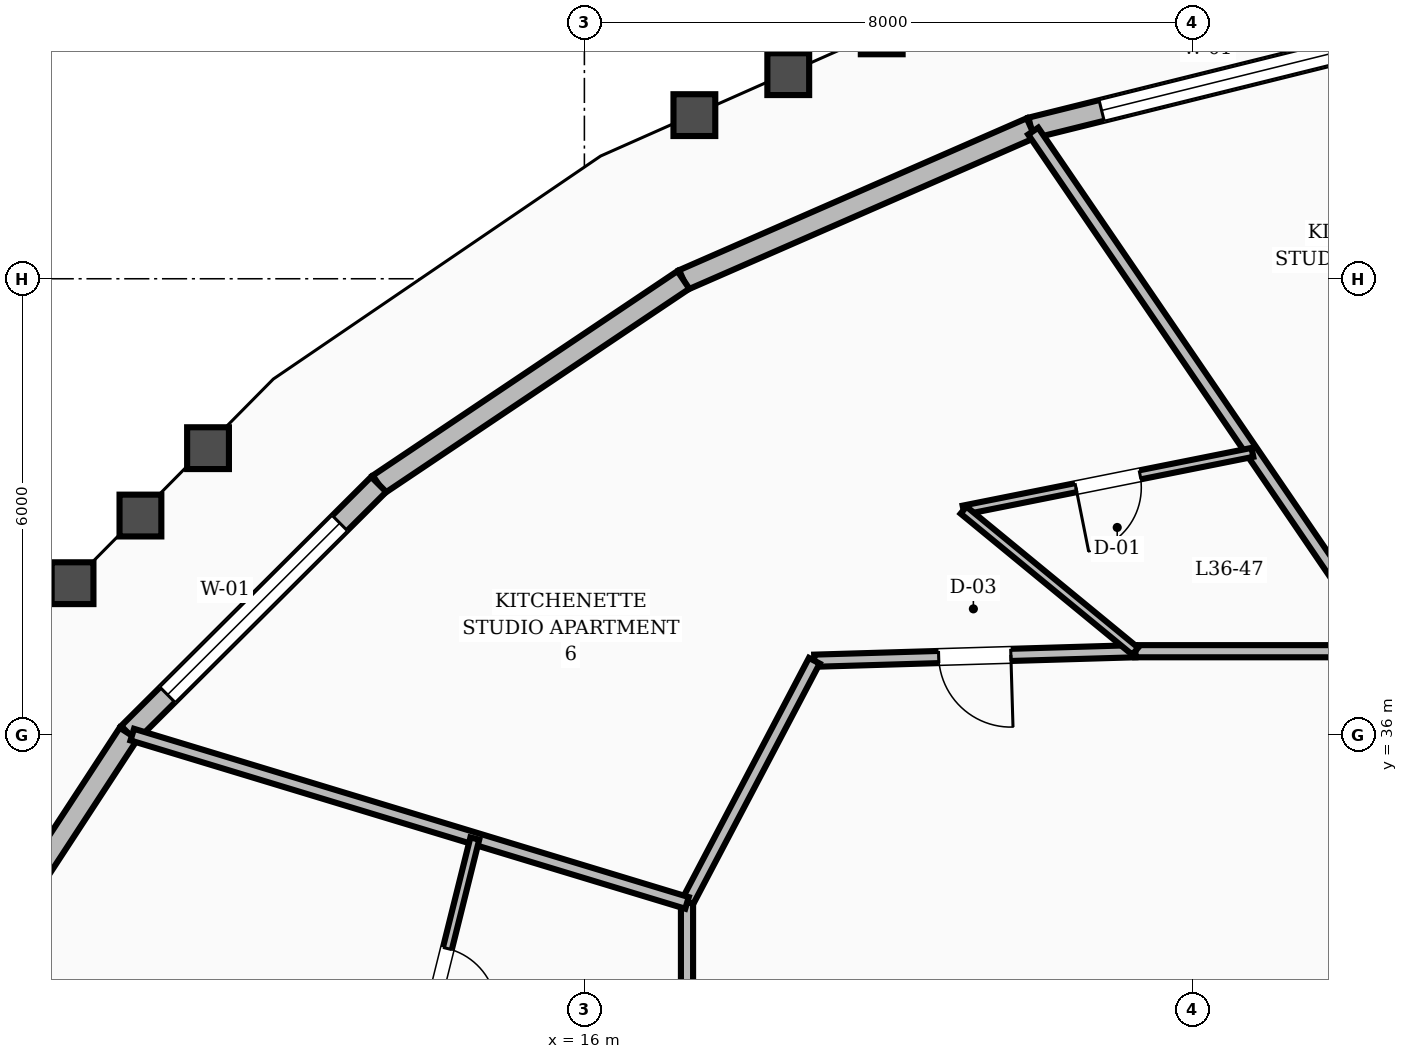
"""IFC4 building model, lengths in metres.
Left out: names, types, materials, properties, quantities, classifications, styles, units other than length and angle.
Written with IfcOpenShell. Run it as: python <this file> out.ifc"""

import sys

from ifc_helpers import new_model, si_unit, direction, frame, frame_2d, origin, place, context, subcontext, project, spatial, rectangle, extrude, element, fill, save


model = new_model("IFC4")
c1 = context("Model", 3, precision=1e-05, world=origin(), true_north=direction((0.0, 1.0)))
c2 = subcontext(c1, "Body", "Model", "MODEL_VIEW")
j1 = project(units=[si_unit("LENGTHUNIT", "METRE"), si_unit("PLANEANGLEUNIT", "RADIAN")], contexts=[c1])
p1 = place(None, origin())
s1 = spatial("IfcSite", under=j1, at=p1, CompositionType="ELEMENT")
p2 = place(p1, origin())
s2 = spatial("IfcBuilding", under=s1, at=p2, CompositionType="ELEMENT")
p3 = place(p2, frame((0.0, 0.0, 142.4)))
s3 = spatial("IfcBuildingStorey", under=s2, at=p3, CompositionType="ELEMENT", Elevation=142.4)
p4 = place(p3, frame((26.839, 45.215, 0.0), z_axis=(0.0, 0.0, 1.0), x_axis=(-0.970601368837, -0.240692714498, 0.0)))
e1 = element("IfcWall", 1, at=p4, inside=s3, PredefinedType="STANDARD", context=c2, shape_type="SweptSolid", body=[
    extrude(rectangle(XDim=5.113, YDim=0.28, at=frame_2d((2.557, 0.0))), origin(), (0.0, 0.0, 1.0), 2.82),
])
p5 = place(p4, frame((0.957, 0.0, 0.8)))
e2 = element("IfcOpeningElement", 2, at=p5, cuts=e1, PredefinedType="OPENING", context=c2, shape_type="SweptSolid", body=[
    extrude(rectangle(XDim=3.2, YDim=1.65, at=frame_2d((1.6, 0.825))), frame((0.0, 0.15, 0.0), z_axis=(0.0, -1.0, 0.0), x_axis=(1.0, 0.0, 0.0)), (0.0, 0.0, 1.0), 0.3),
])
p6 = place(p3, frame((21.876, 43.984, 0.0), z_axis=(0.0, 0.0, 1.0), x_axis=(-0.916303206083, -0.400485248821, 0.0)))
e3 = element("IfcWall", 3, at=p6, inside=s3, PredefinedType="STANDARD", context=c2, shape_type="SweptSolid", body=[
    extrude(rectangle(XDim=4.991, YDim=0.28, at=frame_2d((2.496, 0.0))), origin(), (0.0, 0.0, 1.0), 2.82),
])
p7 = place(p3, frame((17.302, 41.985, 0.0), z_axis=(0.0, 0.0, 1.0), x_axis=(-0.830381581739, -0.55719514419, 0.0)))
e4 = element("IfcWall", 4, at=p7, inside=s3, PredefinedType="STANDARD", context=c2, shape_type="SweptSolid", body=[
    extrude(rectangle(XDim=4.828, YDim=0.28, at=frame_2d((2.414, 0.0))), origin(), (0.0, 0.0, 1.0), 2.82),
])
p8 = place(p3, frame((13.294, 39.295, 0.0), z_axis=(0.0, 0.0, 1.0), x_axis=(-0.708393596514, -0.705817619799, 0.0)))
e5 = element("IfcWall", 5, at=p8, inside=s3, PredefinedType="STANDARD", context=c2, shape_type="SweptSolid", body=[
    extrude(rectangle(XDim=4.644, YDim=0.28, at=frame_2d((2.322, 0.0))), origin(), (0.0, 0.0, 1.0), 2.82),
])
p9 = place(p8, frame((0.722, 0.0, 0.8)))
e6 = element("IfcOpeningElement", 6, at=p9, cuts=e5, PredefinedType="OPENING", context=c2, shape_type="SweptSolid", body=[
    extrude(rectangle(XDim=3.2, YDim=1.65, at=frame_2d((1.6, 0.825))), frame((0.0, 0.15, 0.0), z_axis=(0.0, -1.0, 0.0), x_axis=(1.0, 0.0, 0.0)), (0.0, 0.0, 1.0), 0.3),
])
p10 = place(p3, frame((10.004, 36.017, 0.0), z_axis=(0.0, 0.0, 1.0), x_axis=(-0.547212555107, -0.836993679506, 0.0)))
e7 = element("IfcWall", 7, at=p10, inside=s3, PredefinedType="STANDARD", context=c2, shape_type="SweptSolid", body=[
    extrude(rectangle(XDim=4.468, YDim=0.28, at=frame_2d((2.234, 0.0))), origin(), (0.0, 0.0, 1.0), 2.82),
])
p11 = place(p3, frame((26.574, 37.1, 0.0), z_axis=(0.0, 0.0, 1.0), x_axis=(-1.0, 0.0, 0.0)))
e8 = element("IfcWall", 8, at=p11, inside=s3, PredefinedType="SOLIDWALL", context=c2, shape_type="SweptSolid", body=[
    extrude(rectangle(XDim=3.327, YDim=0.16, at=frame_2d((1.664, 0.0))), origin(), (0.0, 0.0, 1.0), 2.8),
])
p12 = place(p3, frame((23.247, 37.1, 0.0), z_axis=(0.0, 0.0, 1.0), x_axis=(-0.999561990195, -0.029594387265, 0.0)))
e9 = element("IfcWall", 9, at=p12, inside=s3, PredefinedType="SOLIDWALL", context=c2, shape_type="SweptSolid", body=[
    extrude(rectangle(XDim=4.224, YDim=0.16, at=frame_2d((2.112, 0.0))), origin(), (0.0, 0.0, 1.0), 2.8),
])
p13 = place(p12, frame((1.637, 0.0, 0.0)))
e10 = element("IfcOpeningElement", 10, at=p13, cuts=e9, PredefinedType="OPENING", context=c2, shape_type="SweptSolid", body=[
    extrude(rectangle(XDim=0.95, YDim=2.1, at=frame_2d((0.475, 1.05))), frame((0.0, 0.09, 0.0), z_axis=(0.0, -1.0, 0.0), x_axis=(1.0, 0.0, 0.0)), (0.0, 0.0, 1.0), 0.18),
])
p14 = place(p3, frame((19.025, 36.975, 0.0), z_axis=(0.0, 0.0, 1.0), x_axis=(-0.46527115782, -0.885168204185, 0.0)))
e11 = element("IfcWall", 11, at=p14, inside=s3, PredefinedType="SOLIDWALL", context=c2, shape_type="SweptSolid", body=[
    extrude(rectangle(XDim=3.6, YDim=0.16, at=frame_2d((1.8, 0.0))), origin(), (0.0, 0.0, 1.0), 2.8),
])
p15 = place(p3, frame((17.35, 33.789, 0.0), z_axis=(0.0, 0.0, 1.0), x_axis=(0.0, -1.0, 0.0)))
e12 = element("IfcWall", 12, at=p15, inside=s3, PredefinedType="SOLIDWALL", context=c2, shape_type="SweptSolid", body=[
    extrude(rectangle(XDim=3.721, YDim=0.16, at=frame_2d((1.86, 0.0))), origin(), (0.0, 0.0, 1.0), 2.8),
])
p16 = place(p3, frame((26.574, 37.1, 0.0), z_axis=(0.0, 0.0, 1.0), x_axis=(-0.563666009878, 0.82600280224, 0.0)))
e13 = element("IfcWall", 13, at=p16, inside=s3, PredefinedType="SOLIDWALL", context=c2, shape_type="SweptSolid", body=[
    extrude(rectangle(XDim=8.284, YDim=0.16, at=frame_2d((4.142, 0.0))), origin(), (0.0, 0.0, 1.0), 2.8),
])
p17 = place(p3, frame((24.789, 39.716, 0.0), z_axis=(0.0, 0.0, 1.0), x_axis=(-0.980612157528, -0.195958660205, 0.0)))
e14 = element("IfcWall", 14, at=p17, inside=s3, PredefinedType="PARTITIONING", context=c2, shape_type="SweptSolid", body=[
    extrude(rectangle(XDim=3.876, YDim=0.12, at=frame_2d((1.938, 0.0))), origin(), (0.0, 0.0, 1.0), 2.8),
])
p18 = place(p17, frame((1.508, 0.0, 0.0)))
e15 = element("IfcOpeningElement", 15, at=p18, cuts=e14, PredefinedType="OPENING", context=c2, shape_type="SweptSolid", body=[
    extrude(rectangle(XDim=0.86, YDim=2.1, at=frame_2d((0.43, 1.05))), frame((0.0, 0.07, 0.0), z_axis=(0.0, -1.0, 0.0), x_axis=(1.0, 0.0, 0.0)), (0.0, 0.0, 1.0), 0.14),
])
p19 = place(p3, frame((23.247, 37.1, 0.0), z_axis=(0.0, 0.0, 1.0), x_axis=(-0.772597513468, 0.634896119206, 0.0)))
e16 = element("IfcWall", 16, at=p19, inside=s3, PredefinedType="PARTITIONING", context=c2, shape_type="SweptSolid", body=[
    extrude(rectangle(XDim=2.924, YDim=0.12, at=frame_2d((1.462, 0.0))), origin(), (0.0, 0.0, 1.0), 2.8),
])
p20 = place(p3, frame((17.35, 33.789, 0.0), z_axis=(0.0, 0.0, 1.0), x_axis=(-0.956945218229, 0.290268581331, 0.0)))
e17 = element("IfcWall", 17, at=p20, inside=s3, PredefinedType="SOLIDWALL", context=c2, shape_type="SweptSolid", body=[
    extrude(rectangle(XDim=7.627, YDim=0.16, at=frame_2d((3.813, 0.0))), origin(), (0.0, 0.0, 1.0), 2.8),
])
p21 = place(p3, frame((14.558, 34.635, 0.0), z_axis=(0.0, 0.0, 1.0), x_axis=(-0.241802876518, -0.970325393313, 0.0)))
e18 = element("IfcWall", 18, at=p21, inside=s3, PredefinedType="PARTITIONING", context=c2, shape_type="SweptSolid", body=[
    extrude(rectangle(XDim=3.842, YDim=0.12, at=frame_2d((1.921, 0.0))), origin(), (0.0, 0.0, 1.0), 2.8),
])
p22 = place(p21, frame((1.491, 0.0, 0.0)))
e19 = element("IfcOpeningElement", 19, at=p22, cuts=e18, PredefinedType="OPENING", context=c2, shape_type="SweptSolid", body=[
    extrude(rectangle(XDim=0.86, YDim=2.1, at=frame_2d((0.43, 1.05))), frame((0.0, 0.07, 0.0), z_axis=(0.0, -1.0, 0.0), x_axis=(1.0, 0.0, 0.0)), (0.0, 0.0, 1.0), 0.14),
])
p23 = place(p5, origin())
e20 = element("IfcWindow", 20, at=p23, inside=s3, PartitioningType="SINGLE_PANEL", PredefinedType="WINDOW", context=c2, shape_type="SweptSolid", body=[
    extrude(rectangle(XDim=3.2, YDim=1.65, at=frame_2d((1.6, 0.825))), frame((0.0, 0.03, 0.0), z_axis=(0.0, -1.0, 0.0), x_axis=(1.0, 0.0, 0.0)), (0.0, 0.0, 1.0), 0.06),
])
fill(e2, e20)
p24 = place(p9, origin())
e21 = element("IfcWindow", 21, at=p24, inside=s3, PartitioningType="SINGLE_PANEL", PredefinedType="WINDOW", context=c2, shape_type="SweptSolid", body=[
    extrude(rectangle(XDim=3.2, YDim=1.65, at=frame_2d((1.6, 0.825))), frame((0.0, 0.03, 0.0), z_axis=(0.0, -1.0, 0.0), x_axis=(1.0, 0.0, 0.0)), (0.0, 0.0, 1.0), 0.06),
])
fill(e6, e21)
p25 = place(p18, origin())
e22 = element("IfcDoor", 22, at=p25, inside=s3, OperationType="SINGLE_SWING_RIGHT", PredefinedType="DOOR", context=c2, shape_type="SweptSolid", body=[
    extrude(rectangle(XDim=0.86, YDim=2.1, at=frame_2d((0.43, 1.05))), frame((0.0, 0.025, 0.0), z_axis=(0.0, -1.0, 0.0), x_axis=(1.0, 0.0, 0.0)), (0.0, 0.0, 1.0), 0.05),
])
fill(e15, e22)
p26 = place(p13, origin())
e23 = element("IfcDoor", 23, at=p26, inside=s3, OperationType="SINGLE_SWING_LEFT", PredefinedType="DOOR", context=c2, shape_type="SweptSolid", body=[
    extrude(rectangle(XDim=0.95, YDim=2.1, at=frame_2d((0.475, 1.05))), frame((0.0, 0.025, 0.0), z_axis=(0.0, -1.0, 0.0), x_axis=(1.0, 0.0, 0.0)), (0.0, 0.0, 1.0), 0.05),
])
fill(e10, e23)
p27 = place(p22, origin())
e24 = element("IfcDoor", 24, at=p27, inside=s3, OperationType="SINGLE_SWING_RIGHT", PredefinedType="DOOR", context=c2, shape_type="SweptSolid", body=[
    extrude(rectangle(XDim=0.86, YDim=2.1, at=frame_2d((0.43, 1.05))), frame((0.0, 0.025, 0.0), z_axis=(0.0, -1.0, 0.0), x_axis=(1.0, 0.0, 0.0)), (0.0, 0.0, 1.0), 0.05),
])
fill(e19, e24)
save(model, sys.argv[1])
